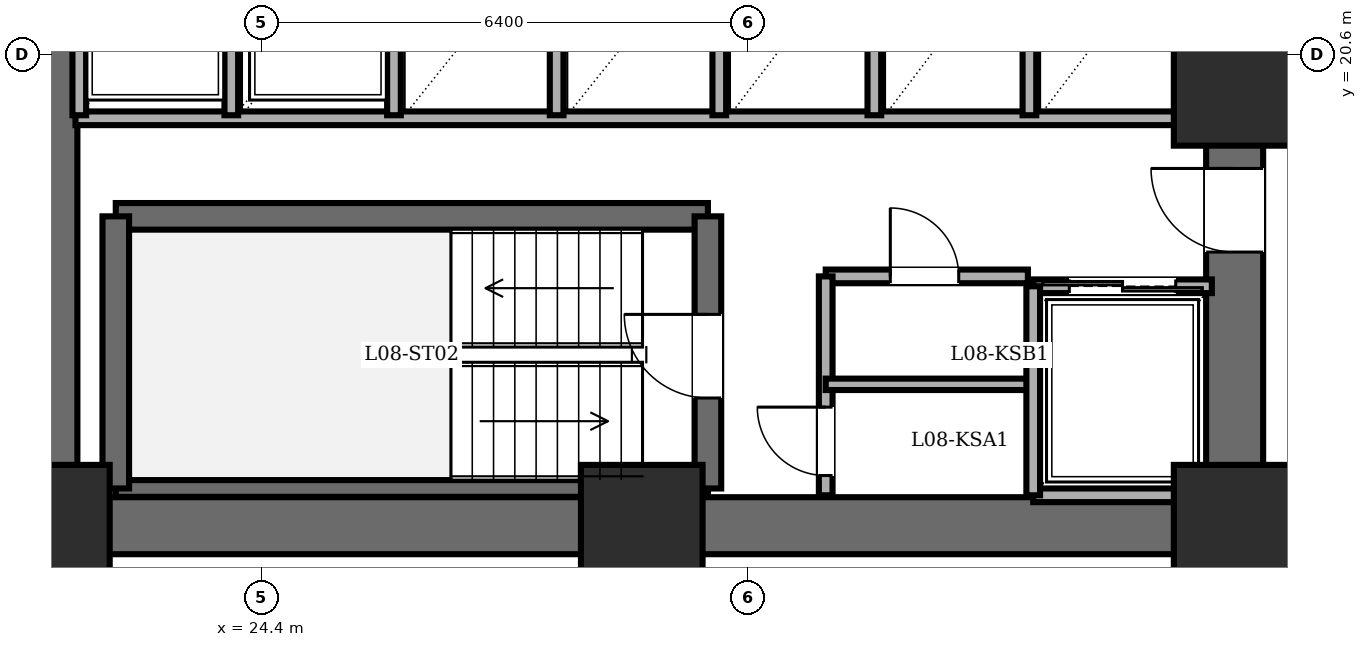
"""IFC4 building model, lengths in metres.
Left out: names, types, materials, properties, quantities, classifications, styles, units other than length and angle.
Written with IfcOpenShell. Run it as: python <this file> out.ifc"""

import sys

from ifc_helpers import new_model, si_unit, direction, frame, frame_2d, origin, origin_2d, place, context, subcontext, project, spatial, rectangle, extrude, element, fill, save


model = new_model("IFC4")
c1 = context("Model", 3, precision=1e-05, world=origin(), true_north=direction((0.0, 1.0)))
c2 = subcontext(c1, "Body", "Model", "MODEL_VIEW")
j1 = project(units=[si_unit("LENGTHUNIT", "METRE"), si_unit("PLANEANGLEUNIT", "RADIAN")], contexts=[c1])
p1 = place(None, origin())
s1 = spatial("IfcSite", under=j1, at=p1, CompositionType="ELEMENT")
p2 = place(p1, origin())
s2 = spatial("IfcBuilding", under=s1, at=p2, CompositionType="ELEMENT")
p3 = place(p2, frame((0.0, 0.0, 32.4)))
s3 = spatial("IfcBuildingStorey", under=s2, at=p3, CompositionType="ELEMENT", Elevation=32.4)
for number, where, z_axis, x_axis in (
    (1, (21.6, 14.4, 0.0), (0.0, 0.0, 1.0), (1.0, 0.0, 0.0)),
    (2, (29.4, 14.4, 0.0), (0.0, 0.0, 1.0), (1.0, 0.0, 0.0)),
    (3, (37.2, 14.4, 0.0), (0.0, 0.0, 1.0), (1.0, 0.0, 0.0)),
    (4, (37.2, 20.2, 0.0), (0.0, 0.0, 1.0), (1.0, 0.0, 0.0)),
):
    element("IfcColumn", number, at=place(p3, frame(where, z_axis=z_axis, x_axis=x_axis)), inside=s3, PredefinedType="COLUMN", context=c2, shape_type="SweptSolid", body=[
        extrude(rectangle(XDim=1.6, YDim=1.6, at=origin_2d()), origin(), (0.0, 0.0, 1.0), 3.6),
    ])
p4 = place(p3, frame((21.6, 14.4, 0.0), z_axis=(0.0, 0.0, 1.0), x_axis=(0.0, 1.0, 0.0)))
e5 = element("IfcWall", 5, at=p4, inside=s3, PredefinedType="SHEAR", context=c2, shape_type="SweptSolid", body=[
    extrude(rectangle(XDim=19.2, YDim=0.75, at=frame_2d((9.6, 0.0))), origin(), (0.0, 0.0, 1.0), 3.4),
])
p5 = place(p3, frame((37.2, 14.4, 0.0), z_axis=(0.0, 0.0, 1.0), x_axis=(-1.0, 0.0, 0.0)))
e6 = element("IfcWall", 6, at=p5, inside=s3, PredefinedType="SHEAR", context=c2, shape_type="SweptSolid", body=[
    extrude(rectangle(XDim=15.6, YDim=0.75, at=frame_2d((7.8, 0.0))), origin(), (0.0, 0.0, 1.0), 3.4),
])
p6 = place(p3, frame((37.2, 14.4, 0.0), z_axis=(0.0, 0.0, 1.0), x_axis=(0.0, 1.0, 0.0)))
e7 = element("IfcWall", 7, at=p6, inside=s3, PredefinedType="SHEAR", context=c2, shape_type="SweptSolid", body=[
    extrude(rectangle(XDim=19.2, YDim=0.75, at=frame_2d((9.6, 0.0))), origin(), (0.0, 0.0, 1.0), 3.4),
])
p7 = place(p6, frame((15.8, 0.0, 0.0)))
e8 = element("IfcOpeningElement", 8, at=p7, cuts=e7, PredefinedType="OPENING", context=c2, shape_type="SweptSolid", body=[
    extrude(rectangle(XDim=1.15, YDim=2.15, at=frame_2d((0.575, 1.075))), frame((0.0, 0.385, 0.0), z_axis=(0.0, -1.0, 0.0), x_axis=(1.0, 0.0, 0.0)), (0.0, 0.0, 1.0), 0.77),
])
p8 = place(p6, frame((3.6, 0.0, 0.0)))
e9 = element("IfcOpeningElement", 9, at=p8, cuts=e7, PredefinedType="OPENING", context=c2, shape_type="SweptSolid", body=[
    extrude(rectangle(XDim=1.1, YDim=2.15, at=frame_2d((0.55, 1.075))), frame((0.0, 0.385, 0.0), z_axis=(0.0, -1.0, 0.0), x_axis=(1.0, 0.0, 0.0)), (0.0, 0.0, 1.0), 0.77),
])
p9 = place(p6, frame((8.6, 0.0, 0.0)))
e10 = element("IfcOpeningElement", 10, at=p9, cuts=e7, PredefinedType="OPENING", context=c2, shape_type="SweptSolid", body=[
    extrude(rectangle(XDim=1.3, YDim=2.2, at=frame_2d((0.65, 1.1))), frame((0.0, 0.385, 0.0), z_axis=(0.0, -1.0, 0.0), x_axis=(1.0, 0.0, 0.0)), (0.0, 0.0, 1.0), 0.77),
])
p10 = place(p3, frame((22.48, 18.47, 0.0), z_axis=(0.0, 0.0, 1.0), x_axis=(1.0, 0.0, 0.0)))
e11 = element("IfcWall", 11, at=p10, inside=s3, PredefinedType="SOLIDWALL", context=c2, shape_type="SweptSolid", body=[
    extrude(rectangle(XDim=7.79, YDim=0.35, at=frame_2d((3.895, 0.0))), origin(), (0.0, 0.0, 1.0), 3.4),
])
p11 = place(p3, frame((22.48, 14.89, 0.0), z_axis=(0.0, 0.0, 1.0), x_axis=(1.0, 0.0, 0.0)))
e12 = element("IfcWall", 12, at=p11, inside=s3, PredefinedType="PARTITIONING", context=c2, shape_type="SweptSolid", body=[
    extrude(rectangle(XDim=7.79, YDim=0.22, at=frame_2d((3.895, 0.0))), origin(), (0.0, 0.0, 1.0), 3.4),
])
p12 = place(p3, frame((22.48, 14.89, 0.0), z_axis=(0.0, 0.0, 1.0), x_axis=(0.0, 1.0, 0.0)))
e13 = element("IfcWall", 13, at=p12, inside=s3, PredefinedType="SOLIDWALL", context=c2, shape_type="SweptSolid", body=[
    extrude(rectangle(XDim=3.58, YDim=0.35, at=frame_2d((1.79, 0.0))), origin(), (0.0, 0.0, 1.0), 3.4),
])
p13 = place(p3, frame((30.27, 14.89, 0.0), z_axis=(0.0, 0.0, 1.0), x_axis=(0.0, 1.0, 0.0)))
e14 = element("IfcWall", 14, at=p13, inside=s3, PredefinedType="SOLIDWALL", context=c2, shape_type="SweptSolid", body=[
    extrude(rectangle(XDim=3.58, YDim=0.35, at=frame_2d((1.79, 0.0))), origin(), (0.0, 0.0, 1.0), 3.4),
])
p14 = place(p13, frame((1.19, 0.0, 0.0)))
e15 = element("IfcOpeningElement", 15, at=p14, cuts=e14, PredefinedType="OPENING", context=c2, shape_type="SweptSolid", body=[
    extrude(rectangle(XDim=1.1, YDim=2.15, at=frame_2d((0.55, 1.075))), frame((0.0, 0.185, 0.0), z_axis=(0.0, -1.0, 0.0), x_axis=(1.0, 0.0, 0.0)), (0.0, 0.0, 1.0), 0.37),
])
p15 = place(p3, frame((21.95, 19.76, 0.0), z_axis=(0.0, 0.0, 1.0), x_axis=(1.0, 0.0, 0.0)))
e16 = element("IfcWall", 16, at=p15, inside=s3, PredefinedType="PARTITIONING", context=c2, shape_type="SweptSolid", body=[
    extrude(rectangle(XDim=14.87, YDim=0.18, at=frame_2d((7.435, 0.0))), origin(), (0.0, 0.0, 1.0), 3.4),
])
p16 = place(p3, frame((31.82, 17.68, 0.0), z_axis=(0.0, 0.0, 1.0), x_axis=(1.0, 0.0, 0.0)))
e17 = element("IfcWall", 17, at=p16, inside=s3, PredefinedType="PARTITIONING", context=c2, shape_type="SweptSolid", body=[
    extrude(rectangle(XDim=2.66, YDim=0.18, at=frame_2d((1.33, 0.0))), origin(), (0.0, 0.0, 1.0), 3.4),
])
p17 = place(p16, frame((0.85, 0.0, 0.0)))
e18 = element("IfcOpeningElement", 18, at=p17, cuts=e17, PredefinedType="OPENING", context=c2, shape_type="SweptSolid", body=[
    extrude(rectangle(XDim=0.9, YDim=2.05, at=frame_2d((0.45, 1.025))), frame((0.0, 0.1, 0.0), z_axis=(0.0, -1.0, 0.0), x_axis=(1.0, 0.0, 0.0)), (0.0, 0.0, 1.0), 0.2),
])
p18 = place(p3, frame((31.82, 14.8, 0.0), z_axis=(0.0, 0.0, 1.0), x_axis=(0.0, 1.0, 0.0)))
e19 = element("IfcWall", 19, at=p18, inside=s3, PredefinedType="PARTITIONING", context=c2, shape_type="SweptSolid", body=[
    extrude(rectangle(XDim=2.88, YDim=0.18, at=frame_2d((1.44, 0.0))), origin(), (0.0, 0.0, 1.0), 3.4),
])
p19 = place(p18, frame((0.26, 0.0, 0.0)))
e20 = element("IfcOpeningElement", 20, at=p19, cuts=e19, PredefinedType="OPENING", context=c2, shape_type="SweptSolid", body=[
    extrude(rectangle(XDim=0.9, YDim=2.05, at=frame_2d((0.45, 1.025))), frame((0.0, 0.1, 0.0), z_axis=(0.0, -1.0, 0.0), x_axis=(1.0, 0.0, 0.0)), (0.0, 0.0, 1.0), 0.2),
])
p20 = place(p3, frame((31.82, 16.26, 0.0), z_axis=(0.0, 0.0, 1.0), x_axis=(1.0, 0.0, 0.0)))
e21 = element("IfcWall", 21, at=p20, inside=s3, PredefinedType="PARTITIONING", context=c2, shape_type="SweptSolid", body=[
    extrude(rectangle(XDim=2.66, YDim=0.15, at=frame_2d((1.33, 0.0))), origin(), (0.0, 0.0, 1.0), 3.4),
])
p21 = place(p3, frame((34.55, 17.55, 0.0), z_axis=(0.0, 0.0, 1.0), x_axis=(1.0, 0.0, 0.0)))
e22 = element("IfcWall", 22, at=p21, inside=s3, PredefinedType="PARTITIONING", context=c2, shape_type="SweptSolid", body=[
    extrude(rectangle(XDim=2.35, YDim=0.18, at=frame_2d((1.175, 0.0))), origin(), (0.0, 0.0, 1.0), 3.4),
])
p22 = place(p21, frame((0.475, 0.0, 0.0)))
e23 = element("IfcOpeningElement", 23, at=p22, cuts=e22, PredefinedType="OPENING", context=c2, shape_type="SweptSolid", body=[
    extrude(rectangle(XDim=1.4, YDim=2.3, at=frame_2d((0.7, 1.15))), frame((0.0, 0.1, 0.0), z_axis=(0.0, -1.0, 0.0), x_axis=(1.0, 0.0, 0.0)), (0.0, 0.0, 1.0), 0.2),
])
p23 = place(p3, frame((36.9, 14.8, 0.0), z_axis=(0.0, 0.0, 1.0), x_axis=(-1.0, 0.0, 0.0)))
e24 = element("IfcWall", 24, at=p23, inside=s3, PredefinedType="PARTITIONING", context=c2, shape_type="SweptSolid", body=[
    extrude(rectangle(XDim=2.35, YDim=0.18, at=frame_2d((1.175, 0.0))), origin(), (0.0, 0.0, 1.0), 3.4),
])
p24 = place(p3, frame((34.55, 17.55, 0.0), z_axis=(0.0, 0.0, 1.0), x_axis=(0.0, -1.0, 0.0)))
e25 = element("IfcWall", 25, at=p24, inside=s3, PredefinedType="PARTITIONING", context=c2, shape_type="SweptSolid", body=[
    extrude(rectangle(XDim=2.75, YDim=0.18, at=frame_2d((1.375, 0.0))), origin(), (0.0, 0.0, 1.0), 3.4),
])
for number, where, z_axis, x_axis in (
    (26, (24.0, 19.8, 0.0), (0.0, 0.0, 1.0), (0.0, 1.0, 0.0)),
    (27, (22.0, 22.3, 0.0), (0.0, 0.0, 1.0), (0.0, -1.0, 0.0)),
    (28, (26.14, 19.8, 0.0), (0.0, 0.0, 1.0), (0.0, 1.0, 0.0)),
    (29, (28.28, 19.8, 0.0), (0.0, 0.0, 1.0), (0.0, 1.0, 0.0)),
    (30, (30.42, 19.8, 0.0), (0.0, 0.0, 1.0), (0.0, 1.0, 0.0)),
    (31, (32.46, 19.8, 0.0), (0.0, 0.0, 1.0), (0.0, 1.0, 0.0)),
    (32, (34.5, 19.8, 0.0), (0.0, 0.0, 1.0), (0.0, 1.0, 0.0)),
    (33, (36.54, 19.8, 0.0), (0.0, 0.0, 1.0), (0.0, 1.0, 0.0)),
):
    element("IfcWall", number, at=place(p3, frame(where, z_axis=z_axis, x_axis=x_axis)), inside=s3, PredefinedType="PARTITIONING", context=c2, shape_type="SweptSolid", body=[
        extrude(rectangle(XDim=2.5, YDim=0.18, at=frame_2d((1.25, 0.0))), origin(), (0.0, 0.0, 1.0), 3.4),
    ])
p25 = place(p14, origin())
e34 = element("IfcDoor", 34, at=p25, inside=s3, OperationType="SINGLE_SWING_RIGHT", PredefinedType="DOOR", context=c2, shape_type="SweptSolid", body=[
    extrude(rectangle(XDim=1.1, YDim=2.15, at=frame_2d((0.55, 1.075))), frame((0.0, 0.025, 0.0), z_axis=(0.0, -1.0, 0.0), x_axis=(1.0, 0.0, 0.0)), (0.0, 0.0, 1.0), 0.05),
])
fill(e15, e34)
p26 = place(p8, origin())
e35 = element("IfcDoor", 35, at=p26, inside=s3, OperationType="SINGLE_SWING_RIGHT", PredefinedType="DOOR", context=c2, shape_type="SweptSolid", body=[
    extrude(rectangle(XDim=1.1, YDim=2.15, at=frame_2d((0.55, 1.075))), frame((0.0, 0.025, 0.0), z_axis=(0.0, -1.0, 0.0), x_axis=(1.0, 0.0, 0.0)), (0.0, 0.0, 1.0), 0.05),
])
fill(e9, e35)
p27 = place(p17, origin())
e36 = element("IfcDoor", 36, at=p27, inside=s3, OperationType="SINGLE_SWING_LEFT", PredefinedType="DOOR", context=c2, shape_type="SweptSolid", body=[
    extrude(rectangle(XDim=0.9, YDim=2.05, at=frame_2d((0.45, 1.025))), frame((0.0, 0.025, 0.0), z_axis=(0.0, -1.0, 0.0), x_axis=(1.0, 0.0, 0.0)), (0.0, 0.0, 1.0), 0.05),
])
fill(e18, e36)
p28 = place(p19, origin())
e37 = element("IfcDoor", 37, at=p28, inside=s3, OperationType="SINGLE_SWING_RIGHT", PredefinedType="DOOR", context=c2, shape_type="SweptSolid", body=[
    extrude(rectangle(XDim=0.9, YDim=2.05, at=frame_2d((0.45, 1.025))), frame((0.0, 0.025, 0.0), z_axis=(0.0, -1.0, 0.0), x_axis=(1.0, 0.0, 0.0)), (0.0, 0.0, 1.0), 0.05),
])
fill(e20, e37)
p29 = place(p22, origin())
e38 = element("IfcDoor", 38, at=p29, inside=s3, OperationType="DOUBLE_DOOR_SLIDING", PredefinedType="DOOR", context=c2, shape_type="SweptSolid", body=[
    extrude(rectangle(XDim=1.4, YDim=2.3, at=frame_2d((0.7, 1.15))), frame((0.0, 0.025, 0.0), z_axis=(0.0, -1.0, 0.0), x_axis=(1.0, 0.0, 0.0)), (0.0, 0.0, 1.0), 0.05),
])
fill(e23, e38)
save(model, sys.argv[1])
